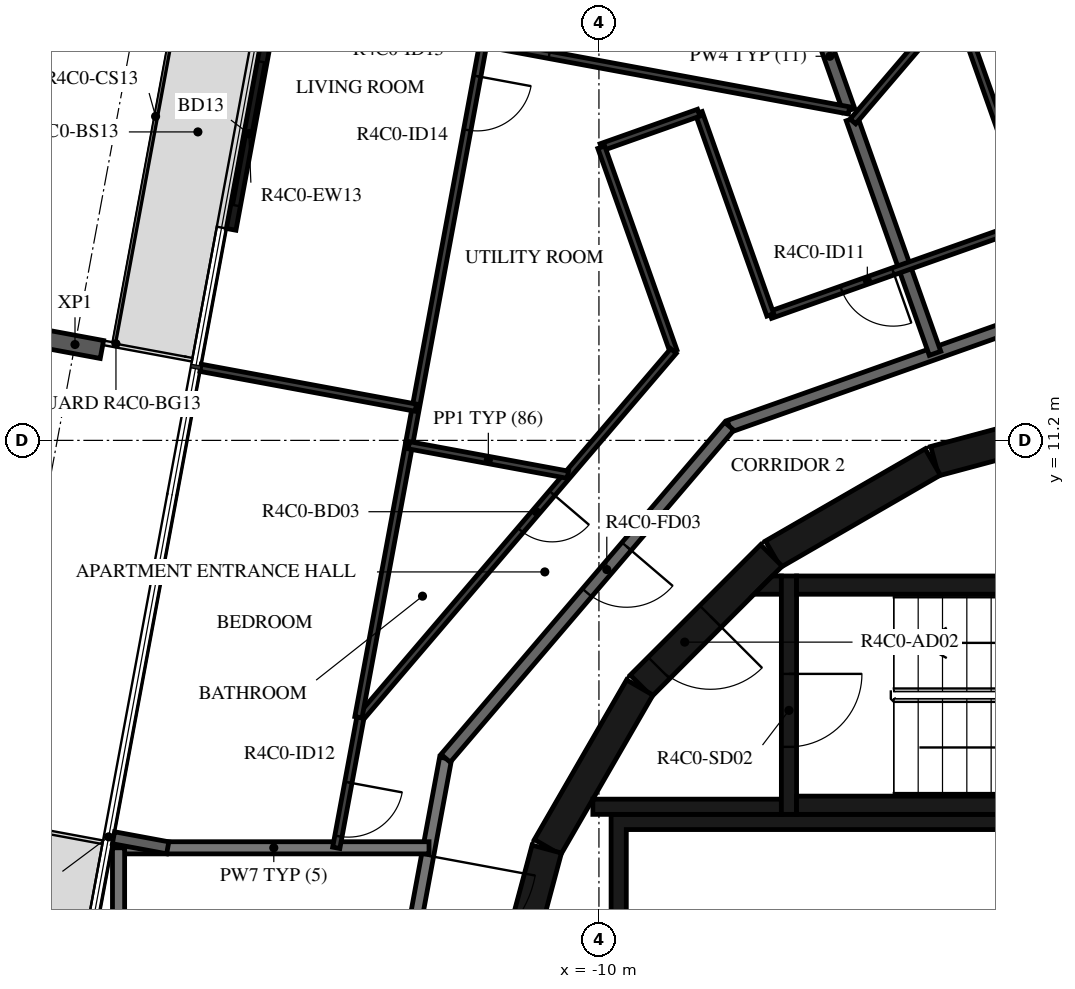
"""IFC4 building model, lengths in metres.
Left out: names, types, materials, properties, quantities, classifications, styles, units other than length and angle.
Written with IfcOpenShell. Run it as: python <this file> out.ifc"""

import sys

from ifc_helpers import new_model, si_unit, direction, frame, frame_2d, origin, origin_2d, place, context, subcontext, project, spatial, polyline, rectangle, i_section, outline, extrude, element, fill, save


model = new_model("IFC4")
c1 = context("Model", 3, precision=1e-05, world=origin(), true_north=direction((0.0, 1.0)))
c2 = subcontext(c1, "Body", "Model", "MODEL_VIEW")
j1 = project(units=[si_unit("LENGTHUNIT", "METRE"), si_unit("PLANEANGLEUNIT", "RADIAN")], contexts=[c1])
p1 = place(None, origin())
s1 = spatial("IfcSite", under=j1, at=p1, CompositionType="ELEMENT")
p2 = place(p1, origin())
s2 = spatial("IfcBuilding", under=s1, at=p2, CompositionType="ELEMENT")
p3 = place(p2, frame((0.0, 0.0, 179.7)))
s3 = spatial("IfcBuildingStorey", under=s2, at=p3, CompositionType="ELEMENT", Elevation=179.7)
p4 = place(p3, frame((-18.616, 12.777, -0.38), z_axis=(0.0, 0.0, 1.0), x_axis=(0.182235967681, 0.983254825609, 0.0)))
e1 = element("IfcColumn", 1, at=p4, inside=s3, PredefinedType="COLUMN", context=c2, shape_type="SweptSolid", body=[
    extrude(i_section(OverallWidth=0.3, OverallDepth=0.9, WebThickness=0.019, FlangeThickness=0.035, FilletRadius=0.03, at=origin_2d()), origin(), (0.0, 0.0, 1.0), 2.616),
])
p5 = place(p3, frame((-15.465, 17.817, 0.0), z_axis=(0.0, 0.0, 1.0), x_axis=(-0.182201278434, -0.983261254264, 0.0)))
e2 = element("IfcWall", 2, at=p5, inside=s3, PredefinedType="STANDARD", context=c2, shape_type="SweptSolid", body=[
    extrude(rectangle(XDim=3.2, YDim=0.16, at=frame_2d((1.6, 0.0))), origin(), (0.0, 0.0, 1.0), 3.05),
])
p6 = place(p5, frame((0.4, 0.0, 0.0)))
e3 = element("IfcOpeningElement", 3, at=p6, cuts=e2, PredefinedType="OPENING", context=c2, shape_type="SweptSolid", body=[
    extrude(rectangle(XDim=2.4, YDim=2.4, at=frame_2d((1.2, 1.2))), frame((0.0, 0.09, 0.0), z_axis=(0.0, -1.0, 0.0), x_axis=(1.0, 0.0, 0.0)), (0.0, 0.0, 1.0), 0.18),
])
for number, where, z_axis, x_axis in (
    (4, (-1.55, 11.643, 0.0), (0.0, 0.0, 1.0), (-0.966, -0.259, 0.0)),
    (5, (-4.51, 10.845, 0.0), (0.0, 0.0, 1.0), (-0.866, -0.5, 0.0)),
):
    element("IfcWall", number, at=place(p3, frame(where, z_axis=z_axis, x_axis=x_axis)), inside=s3, PredefinedType="SHEAR", context=c2, shape_type="SweptSolid", body=[
        extrude(rectangle(XDim=3.033, YDim=0.5, at=frame_2d((1.516, 0.0))), origin(), (0.0, 0.0, 1.0), 3.05),
    ])
p7 = place(p3, frame((-7.164, 9.308, 0.0), z_axis=(0.0, 0.0, 1.0), x_axis=(-0.707106781187, -0.707106781187, 0.0)))
e6 = element("IfcWall", 6, at=p7, inside=s3, PredefinedType="SHEAR", context=c2, shape_type="SweptSolid", body=[
    extrude(rectangle(XDim=3.032, YDim=0.5, at=frame_2d((1.516, 0.0))), origin(), (0.0, 0.0, 1.0), 3.05),
])
p8 = place(p7, frame((1.416, 0.0, 0.0)))
e7 = element("IfcOpeningElement", 7, at=p8, cuts=e6, PredefinedType="OPENING", context=c2, shape_type="SweptSolid", body=[
    extrude(rectangle(XDim=1.2, YDim=2.1, at=frame_2d((0.6, 1.05))), frame((0.0, 0.26, 0.0), z_axis=(0.0, -1.0, 0.0), x_axis=(1.0, 0.0, 0.0)), (0.0, 0.0, 1.0), 0.52),
])
for number, where, z_axis, x_axis in (
    (8, (-9.329, 7.137, 0.0), (0.0, 0.0, 1.0), (-0.5, -0.866, 0.0)),
    (9, (-10.858, 4.479, 0.0), (0.0, 0.0, 1.0), (-0.259, -0.966, 0.0)),
):
    element("IfcWall", number, at=place(p3, frame(where, z_axis=z_axis, x_axis=x_axis)), inside=s3, PredefinedType="SHEAR", context=c2, shape_type="SweptSolid", body=[
        extrude(rectangle(XDim=3.033, YDim=0.5, at=frame_2d((1.516, 0.0))), origin(), (0.0, 0.0, 1.0), 3.05),
    ])
for number, where, z_axis, x_axis in (
    (10, (-6.75, 5.2, 0.0), (0.0, 0.0, 1.0), (1.0, 0.0, 0.0)),
    (11, (-6.75, 8.82, 0.0), (0.0, 0.0, 1.0), (1.0, 0.0, 0.0)),
):
    element("IfcWall", number, at=place(p3, frame(where, z_axis=z_axis, x_axis=x_axis)), inside=s3, PredefinedType="SHEAR", context=c2, shape_type="SweptSolid", body=[
        extrude(rectangle(XDim=6.75, YDim=0.3, at=frame_2d((3.375, 0.0))), origin(), (0.0, 0.0, 1.0), 3.05),
    ])
p9 = place(p3, frame((-6.875, 8.97, 0.0), z_axis=(0.0, 0.0, 1.0), x_axis=(0.0, -1.0, 0.0)))
e12 = element("IfcWall", 12, at=p9, inside=s3, PredefinedType="SHEAR", context=c2, shape_type="SweptSolid", body=[
    extrude(rectangle(XDim=3.92, YDim=0.25, at=frame_2d((1.96, 0.0))), origin(), (0.0, 0.0, 1.0), 3.05),
])
p10 = place(p9, frame((1.61, 0.0, 0.0)))
e13 = element("IfcOpeningElement", 13, at=p10, cuts=e12, PredefinedType="OPENING", context=c2, shape_type="SweptSolid", body=[
    extrude(rectangle(XDim=1.2, YDim=2.1, at=frame_2d((0.6, 1.05))), frame((0.0, 0.135, 0.0), z_axis=(0.0, -1.0, 0.0), x_axis=(1.0, 0.0, 0.0)), (0.0, 0.0, 1.0), 0.27),
])
p11 = place(p3, frame((-7.0, 5.175, 0.0), z_axis=(0.0, 0.0, 1.0), x_axis=(-1.0, 0.0, 0.0)))
e14 = element("IfcWall", 14, at=p11, inside=s3, PredefinedType="SHEAR", context=c2, shape_type="SweptSolid", body=[
    extrude(rectangle(XDim=3.1, YDim=0.25, at=frame_2d((1.55, 0.0))), origin(), (0.0, 0.0, 1.0), 3.05),
])
p12 = place(p3, origin())
e15 = element("IfcWall", 15, at=p12, inside=s3, PredefinedType="SHEAR", context=c2, shape_type="SweptSolid", body=[
    extrude(outline(polyline([(-7.148, 8.97), (-7.0, 8.97), (-7.0, 8.67), (-7.448, 8.67), (-7.148, 8.97)])), origin(), (0.0, 0.0, 1.0), 3.05),
])
p13 = place(p3, origin())
e16 = element("IfcWall", 16, at=p13, inside=s3, PredefinedType="SHEAR", context=c2, shape_type="SweptSolid", body=[
    extrude(outline(polyline([(-9.55, 4.8), (-1.2, 4.8), (-1.2, 1.9), (-0.95, 1.9), (-0.95, 4.8), (0.95, 4.8), (0.95, 1.9), (1.2, 1.9), (1.2, 4.8), (3.1, 4.8), (3.1, 1.9), (3.35, 1.9), (3.35, 4.8), (5.25, 4.8), (5.25, 1.9), (5.5, 1.9), (5.5, 4.8), (7.4, 4.8), (7.4, 1.9), (7.65, 1.9), (7.65, 4.8), (9.55, 4.8), (9.55, 1.9), (9.8, 1.9), (9.8, 4.8), (9.8, 5.05), (-9.8, 5.05), (-9.8, 4.8), (-9.8, 1.9), (-9.55, 1.9), (-9.55, 4.8)])), origin(), (0.0, 0.0, 1.0), 3.05),
])
p14 = place(p3, frame((-12.521, 5.972, 0.0), z_axis=(0.0, 0.0, 1.0), x_axis=(-0.182251559718, -0.983251935661, 0.0)))
e17 = element("IfcWall", 17, at=p14, inside=s3, PredefinedType="STANDARD", context=c2, shape_type="SweptSolid", body=[
    extrude(rectangle(XDim=5.117, YDim=0.2, at=frame_2d((2.559, 0.0))), origin(), (0.0, 0.0, 1.0), 3.05),
])
p15 = place(p14, frame((1.627, 0.0, 0.0)))
e18 = element("IfcOpeningElement", 18, at=p15, cuts=e17, PredefinedType="OPENING", context=c2, shape_type="SweptSolid", body=[
    extrude(rectangle(XDim=1.8, YDim=2.1, at=frame_2d((0.9, 1.05))), frame((0.0, 0.11, 0.0), z_axis=(0.0, -1.0, 0.0), x_axis=(1.0, 0.0, 0.0)), (0.0, 0.0, 1.0), 0.22),
])
p16 = place(p3, frame((-2.359, 13.38, 0.0), z_axis=(0.0, 0.0, 1.0), x_axis=(-0.942647529236, -0.333789807551, 0.0)))
e19 = element("IfcWall", 19, at=p16, inside=s3, PredefinedType="STANDARD", context=c2, shape_type="SweptSolid", body=[
    extrude(rectangle(XDim=5.833, YDim=0.2, at=frame_2d((2.917, 0.0))), origin(), (0.0, 0.0, 1.0), 3.05),
])
p17 = place(p3, frame((-7.858, 11.433, 0.0), z_axis=(0.0, 0.0, 1.0), x_axis=(-0.649440801937, -0.760412154545, 0.0)))
e20 = element("IfcWall", 20, at=p17, inside=s3, PredefinedType="STANDARD", context=c2, shape_type="SweptSolid", body=[
    extrude(rectangle(XDim=7.181, YDim=0.2, at=frame_2d((3.59, 0.0))), origin(), (0.0, 0.0, 1.0), 3.05),
])
p18 = place(p17, frame((2.6, 0.0, 0.0)))
e21 = element("IfcOpeningElement", 21, at=p18, cuts=e20, PredefinedType="OPENING", context=c2, shape_type="SweptSolid", body=[
    extrude(rectangle(XDim=1.0, YDim=2.1, at=frame_2d((0.5, 1.05))), frame((0.0, 0.11, 0.0), z_axis=(0.0, -1.0, 0.0), x_axis=(1.0, 0.0, 0.0)), (0.0, 0.0, 1.0), 0.22),
])
p19 = place(p3, frame((-12.794, 4.5, 0.0), z_axis=(0.0, 0.0, 1.0), x_axis=(-1.0, 0.0, 0.0)))
e22 = element("IfcWall", 22, at=p19, inside=s3, PredefinedType="STANDARD", context=c2, shape_type="SweptSolid", body=[
    extrude(rectangle(XDim=5.106, YDim=0.2, at=frame_2d((2.553, 0.0))), origin(), (0.0, 0.0, 1.0), 3.05),
])
p20 = place(p3, frame((-17.9, 4.5, 0.0), z_axis=(0.0, 0.0, 1.0), x_axis=(0.0, -1.0, 0.0)))
e23 = element("IfcWall", 23, at=p20, inside=s3, PredefinedType="STANDARD", context=c2, shape_type="SweptSolid", body=[
    extrude(rectangle(XDim=9.0, YDim=0.2, at=frame_2d((4.5, 0.0))), origin(), (0.0, 0.0, 1.0), 3.05),
])
p21 = place(p3, frame((-5.839, 16.488, 0.0), z_axis=(0.0, 0.0, 1.0), x_axis=(0.333840515054, -0.942629572265, 0.0)))
e24 = element("IfcWall", 24, at=p21, inside=s3, PredefinedType="STANDARD", context=c2, shape_type="SweptSolid", body=[
    extrude(rectangle(XDim=4.092, YDim=0.2, at=frame_2d((2.046, 0.0))), origin(), (0.0, 0.0, 1.0), 3.05),
])
p22 = place(p3, frame((-6.518, 18.408, 0.0), z_axis=(0.0, 0.0, 1.0), x_axis=(0.333725210903, -0.942670400303, 0.0)))
e25 = element("IfcWall", 25, at=p22, inside=s3, PredefinedType="STANDARD", context=c2, shape_type="SweptSolid", body=[
    extrude(rectangle(XDim=1.89, YDim=0.2, at=frame_2d((0.945, 0.0))), origin(), (0.0, 0.0, 1.0), 3.05),
])
p23 = place(p3, frame((-17.984, 4.665, 0.0), z_axis=(0.0, 0.0, 1.0), x_axis=(0.98328378843, -0.182079629313, 0.0)))
e26 = element("IfcWall", 26, at=p23, inside=s3, PredefinedType="STANDARD", context=c2, shape_type="SweptSolid", body=[
    extrude(rectangle(XDim=0.908, YDim=0.2, at=frame_2d((0.454, 0.0))), origin(), (0.0, 0.0, 1.0), 3.05),
])
p24 = place(p3, frame((8.702, 12.206, 0.0), z_axis=(0.0, 0.0, 1.0), x_axis=(-0.760401313718, 0.649453494945, 0.0)))
e27 = element("IfcWall", 27, at=p24, inside=s3, PredefinedType="PARTITIONING", context=c2, shape_type="SweptSolid", body=[
    extrude(rectangle(XDim=16.724, YDim=0.12, at=frame_2d((8.362, 0.0))), origin(), (0.0, 0.0, 1.0), 3.05),
])
p25 = place(p24, frame((0.2, 0.0, 0.0)))
e28 = element("IfcOpeningElement", 28, at=p25, cuts=e27, PredefinedType="OPENING", context=c2, shape_type="SweptSolid", body=[
    extrude(rectangle(XDim=0.9, YDim=2.1, at=frame_2d((0.45, 1.05))), frame((0.0, 0.07, 0.0), z_axis=(0.0, -1.0, 0.0), x_axis=(1.0, 0.0, 0.0)), (0.0, 0.0, 1.0), 0.14),
])
p26 = place(p24, frame((8.02, 0.0, 0.0)))
e29 = element("IfcOpeningElement", 29, at=p26, cuts=e27, PredefinedType="OPENING", context=c2, shape_type="SweptSolid", body=[
    extrude(rectangle(XDim=0.9, YDim=2.1, at=frame_2d((0.45, 1.05))), frame((0.0, 0.07, 0.0), z_axis=(0.0, -1.0, 0.0), x_axis=(1.0, 0.0, 0.0)), (0.0, 0.0, 1.0), 0.14),
])
p27 = place(p24, frame((14.412, 0.0, 0.0)))
e30 = element("IfcOpeningElement", 30, at=p27, cuts=e27, PredefinedType="OPENING", context=c2, shape_type="SweptSolid", body=[
    extrude(rectangle(XDim=0.9, YDim=2.1, at=frame_2d((0.45, 1.05))), frame((0.0, 0.07, 0.0), z_axis=(0.0, -1.0, 0.0), x_axis=(1.0, 0.0, 0.0)), (0.0, 0.0, 1.0), 0.14),
])
p28 = place(p3, frame((-4.021, 18.101, 0.0), z_axis=(0.0, 0.0, 1.0), x_axis=(0.333811035895, -0.942640012048, 0.0)))
e31 = element("IfcWall", 31, at=p28, inside=s3, PredefinedType="PARTITIONING", context=c2, shape_type="SweptSolid", body=[
    extrude(rectangle(XDim=3.505, YDim=0.12, at=frame_2d((1.752, 0.0))), origin(), (0.0, 0.0, 1.0), 3.05),
])
p29 = place(p3, frame((-2.852, 14.797, 0.0), z_axis=(0.0, 0.0, 1.0), x_axis=(-0.942629664375, -0.333840254973, 0.0)))
e32 = element("IfcWall", 32, at=p29, inside=s3, PredefinedType="PARTITIONING", context=c2, shape_type="SweptSolid", body=[
    extrude(rectangle(XDim=4.593, YDim=0.12, at=frame_2d((2.297, 0.0))), origin(), (0.0, 0.0, 1.0), 3.05),
])
p30 = place(p29, frame((2.451, 0.0, 0.0)))
e33 = element("IfcOpeningElement", 33, at=p30, cuts=e32, PredefinedType="OPENING", context=c2, shape_type="SweptSolid", body=[
    extrude(rectangle(XDim=0.9, YDim=2.1, at=frame_2d((0.45, 1.05))), frame((0.0, 0.07, 0.0), z_axis=(0.0, -1.0, 0.0), x_axis=(1.0, 0.0, 0.0)), (0.0, 0.0, 1.0), 0.14),
])
p31 = place(p3, frame((-1.79, 21.167, 0.0), z_axis=(0.0, 0.0, 1.0), x_axis=(-0.649456490412, -0.7603987553, 0.0)))
e34 = element("IfcWall", 34, at=p31, inside=s3, PredefinedType="PARTITIONING", context=c2, shape_type="SweptSolid", body=[
    extrude(rectangle(XDim=6.21, YDim=0.12, at=frame_2d((3.105, 0.0))), origin(), (0.0, 0.0, 1.0), 3.05),
])
p32 = place(p31, frame((0.2, 0.0, 0.0)))
e35 = element("IfcOpeningElement", 35, at=p32, cuts=e34, PredefinedType="OPENING", context=c2, shape_type="SweptSolid", body=[
    extrude(rectangle(XDim=0.9, YDim=2.1, at=frame_2d((0.45, 1.05))), frame((0.0, 0.07, 0.0), z_axis=(0.0, -1.0, 0.0), x_axis=(1.0, 0.0, 0.0)), (0.0, 0.0, 1.0), 0.14),
])
p33 = place(p3, frame((-7.181, 13.263, 0.0), z_axis=(0.0, 0.0, 1.0), x_axis=(-0.333822798183, 0.942635846663, 0.0)))
e36 = element("IfcWall", 36, at=p33, inside=s3, PredefinedType="PARTITIONING", context=c2, shape_type="SweptSolid", body=[
    extrude(rectangle(XDim=3.527, YDim=0.12, at=frame_2d((1.764, 0.0))), origin(), (0.0, 0.0, 1.0), 3.05),
])
p34 = place(p3, frame((-8.359, 16.588, 0.0), z_axis=(0.0, 0.0, 1.0), x_axis=(-0.942661115325, -0.333751436931, 0.0)))
e37 = element("IfcWall", 37, at=p34, inside=s3, PredefinedType="PARTITIONING", context=c2, shape_type="SweptSolid", body=[
    extrude(rectangle(XDim=1.7, YDim=0.12, at=frame_2d((0.85, 0.0))), origin(), (0.0, 0.0, 1.0), 3.05),
])
p35 = place(p3, frame((-9.961, 16.021, 0.0), z_axis=(0.0, 0.0, 1.0), x_axis=(0.333803930912, -0.94264252806, 0.0)))
e38 = element("IfcWall", 38, at=p35, inside=s3, PredefinedType="PARTITIONING", context=c2, shape_type="SweptSolid", body=[
    extrude(rectangle(XDim=3.556, YDim=0.12, at=frame_2d((1.778, 0.0))), origin(), (0.0, 0.0, 1.0), 3.05),
])
p36 = place(p3, frame((-8.774, 12.669, 0.0), z_axis=(0.0, 0.0, 1.0), x_axis=(-0.649446157105, -0.760407580855, 0.0)))
e39 = element("IfcWall", 39, at=p36, inside=s3, PredefinedType="PARTITIONING", context=c2, shape_type="SweptSolid", body=[
    extrude(rectangle(XDim=7.927, YDim=0.12, at=frame_2d((3.964, 0.0))), origin(), (0.0, 0.0, 1.0), 3.05),
])
p37 = place(p36, frame((3.074, 0.0, 0.0)))
e40 = element("IfcOpeningElement", 40, at=p37, cuts=e39, PredefinedType="OPENING", context=c2, shape_type="SweptSolid", body=[
    extrude(rectangle(XDim=0.8, YDim=2.1, at=frame_2d((0.4, 1.05))), frame((0.0, 0.07, 0.0), z_axis=(0.0, -1.0, 0.0), x_axis=(1.0, 0.0, 0.0)), (0.0, 0.0, 1.0), 0.14),
])
p38 = place(p3, frame((-13.923, 6.641, 0.0), z_axis=(0.0, 0.0, 1.0), x_axis=(-0.182209715759, -0.983259690765, 0.0)))
e41 = element("IfcWall", 41, at=p38, inside=s3, PredefinedType="PARTITIONING", context=c2, shape_type="SweptSolid", body=[
    extrude(rectangle(XDim=2.177, YDim=0.12, at=frame_2d((1.089, 0.0))), origin(), (0.0, 0.0, 1.0), 3.05),
])
p39 = place(p38, frame((1.083, 0.0, 0.0)))
e42 = element("IfcOpeningElement", 42, at=p39, cuts=e41, PredefinedType="OPENING", context=c2, shape_type="SweptSolid", body=[
    extrude(rectangle(XDim=0.9, YDim=2.1, at=frame_2d((0.45, 1.05))), frame((0.0, 0.07, 0.0), z_axis=(0.0, -1.0, 0.0), x_axis=(1.0, 0.0, 0.0)), (0.0, 0.0, 1.0), 0.14),
])
p40 = place(p3, frame((-13.955, 6.647, 0.0), z_axis=(0.0, 0.0, 1.0), x_axis=(0.182264522222, 0.983249532896, 0.0)))
e43 = element("IfcWall", 43, at=p40, inside=s3, PredefinedType="PARTITIONING", context=c2, shape_type="SweptSolid", body=[
    extrude(rectangle(XDim=4.589, YDim=0.12, at=frame_2d((2.294, 0.0))), origin(), (0.0, 0.0, 1.0), 3.05),
])
p41 = place(p3, frame((-11.899, 17.74, 0.0), z_axis=(0.0, 0.0, 1.0), x_axis=(0.983254721409, -0.182236529889, 0.0)))
e44 = element("IfcWall", 44, at=p41, inside=s3, PredefinedType="PARTITIONING", context=c2, shape_type="SweptSolid", body=[
    extrude(rectangle(XDim=6.114, YDim=0.12, at=frame_2d((3.057, 0.0))), origin(), (0.0, 0.0, 1.0), 3.05),
])
p42 = place(p41, frame((0.2, 0.0, 0.0)))
e45 = element("IfcOpeningElement", 45, at=p42, cuts=e44, PredefinedType="OPENING", context=c2, shape_type="SweptSolid", body=[
    extrude(rectangle(XDim=0.9, YDim=2.1, at=frame_2d((0.45, 1.05))), frame((0.0, 0.07, 0.0), z_axis=(0.0, -1.0, 0.0), x_axis=(1.0, 0.0, 0.0)), (0.0, 0.0, 1.0), 0.14),
])
p43 = place(p3, frame((-11.396, 20.453, 0.0), z_axis=(0.0, 0.0, 1.0), x_axis=(-0.182223370439, -0.983257160292, 0.0)))
e46 = element("IfcWall", 46, at=p43, inside=s3, PredefinedType="PARTITIONING", context=c2, shape_type="SweptSolid", body=[
    extrude(rectangle(XDim=9.452, YDim=0.12, at=frame_2d((4.726, 0.0))), origin(), (0.0, 0.0, 1.0), 3.05),
])
p44 = place(p43, frame((3.319, 0.0, 0.0)))
e47 = element("IfcOpeningElement", 47, at=p44, cuts=e46, PredefinedType="OPENING", context=c2, shape_type="SweptSolid", body=[
    extrude(rectangle(XDim=0.9, YDim=2.1, at=frame_2d((0.45, 1.05))), frame((0.0, 0.07, 0.0), z_axis=(0.0, -1.0, 0.0), x_axis=(1.0, 0.0, 0.0)), (0.0, 0.0, 1.0), 0.14),
])
p45 = place(p43, frame((0.2, 0.0, 0.0)))
e48 = element("IfcOpeningElement", 48, at=p45, cuts=e46, PredefinedType="OPENING", context=c2, shape_type="SweptSolid", body=[
    extrude(rectangle(XDim=0.9, YDim=2.1, at=frame_2d((0.45, 1.05))), frame((0.0, 0.07, 0.0), z_axis=(0.0, -1.0, 0.0), x_axis=(1.0, 0.0, 0.0)), (0.0, 0.0, 1.0), 0.14),
])
p46 = place(p3, frame((-13.126, 11.12, 0.0), z_axis=(0.0, 0.0, 1.0), x_axis=(0.983257646361, -0.182220747645, 0.0)))
e49 = element("IfcWall", 49, at=p46, inside=s3, PredefinedType="PARTITIONING", context=c2, shape_type="SweptSolid", body=[
    extrude(rectangle(XDim=2.659, YDim=0.12, at=frame_2d((1.33, 0.0))), origin(), (0.0, 0.0, 1.0), 3.05),
])
p47 = place(p3, frame((-16.552, 12.394, 0.0), z_axis=(0.0, 0.0, 1.0), x_axis=(0.983257712156, -0.182220392618, 0.0)))
e50 = element("IfcWall", 50, at=p47, inside=s3, PredefinedType="PARTITIONING", context=c2, shape_type="SweptSolid", body=[
    extrude(rectangle(XDim=3.6, YDim=0.12, at=frame_2d((1.8, 0.0))), origin(), (0.0, 0.0, 1.0), 3.05),
])
p48 = place(p6, origin())
e51 = element("IfcDoor", 51, at=p48, inside=s3, OperationType="DOUBLE_DOOR_SLIDING", PredefinedType="DOOR", context=c2, shape_type="SweptSolid", body=[
    extrude(rectangle(XDim=2.4, YDim=2.4, at=frame_2d((1.2, 1.2))), frame((0.0, 0.025, 0.0), z_axis=(0.0, -1.0, 0.0), x_axis=(1.0, 0.0, 0.0)), (0.0, 0.0, 1.0), 0.05),
])
fill(e3, e51)
p49 = place(p10, origin())
e52 = element("IfcDoor", 52, at=p49, inside=s3, OperationType="SINGLE_SWING_LEFT", PredefinedType="DOOR", context=c2, shape_type="SweptSolid", body=[
    extrude(rectangle(XDim=1.2, YDim=2.1, at=frame_2d((0.6, 1.05))), frame((0.0, 0.025, 0.0), z_axis=(0.0, -1.0, 0.0), x_axis=(1.0, 0.0, 0.0)), (0.0, 0.0, 1.0), 0.05),
])
fill(e13, e52)
p50 = place(p8, origin())
e53 = element("IfcDoor", 53, at=p50, inside=s3, OperationType="SINGLE_SWING_RIGHT", PredefinedType="DOOR", context=c2, shape_type="SweptSolid", body=[
    extrude(rectangle(XDim=1.2, YDim=2.1, at=frame_2d((0.6, 1.05))), frame((0.0, 0.025, 0.0), z_axis=(0.0, -1.0, 0.0), x_axis=(1.0, 0.0, 0.0)), (0.0, 0.0, 1.0), 0.05),
])
fill(e7, e53)
p51 = place(p18, origin())
e54 = element("IfcDoor", 54, at=p51, inside=s3, OperationType="SINGLE_SWING_LEFT", PredefinedType="DOOR", context=c2, shape_type="SweptSolid", body=[
    extrude(rectangle(XDim=1.0, YDim=2.1, at=frame_2d((0.5, 1.05))), frame((0.0, 0.025, 0.0), z_axis=(0.0, -1.0, 0.0), x_axis=(1.0, 0.0, 0.0)), (0.0, 0.0, 1.0), 0.05),
])
fill(e21, e54)
p52 = place(p30, origin())
e55 = element("IfcDoor", 55, at=p52, inside=s3, OperationType="SINGLE_SWING_LEFT", PredefinedType="DOOR", context=c2, shape_type="SweptSolid", body=[
    extrude(rectangle(XDim=0.9, YDim=2.1, at=frame_2d((0.45, 1.05))), frame((0.0, 0.025, 0.0), z_axis=(0.0, -1.0, 0.0), x_axis=(1.0, 0.0, 0.0)), (0.0, 0.0, 1.0), 0.05),
])
fill(e33, e55)
p53 = place(p37, origin())
e56 = element("IfcDoor", 56, at=p53, inside=s3, OperationType="SINGLE_SWING_LEFT", PredefinedType="DOOR", context=c2, shape_type="SweptSolid", body=[
    extrude(rectangle(XDim=0.8, YDim=2.1, at=frame_2d((0.4, 1.05))), frame((0.0, 0.025, 0.0), z_axis=(0.0, -1.0, 0.0), x_axis=(1.0, 0.0, 0.0)), (0.0, 0.0, 1.0), 0.05),
])
fill(e40, e56)
p54 = place(p39, origin())
e57 = element("IfcDoor", 57, at=p54, inside=s3, OperationType="SINGLE_SWING_LEFT", PredefinedType="DOOR", context=c2, shape_type="SweptSolid", body=[
    extrude(rectangle(XDim=0.9, YDim=2.1, at=frame_2d((0.45, 1.05))), frame((0.0, 0.025, 0.0), z_axis=(0.0, -1.0, 0.0), x_axis=(1.0, 0.0, 0.0)), (0.0, 0.0, 1.0), 0.05),
])
fill(e42, e57)
p55 = place(p42, origin())
e58 = element("IfcDoor", 58, at=p55, inside=s3, OperationType="SINGLE_SWING_LEFT", PredefinedType="DOOR", context=c2, shape_type="SweptSolid", body=[
    extrude(rectangle(XDim=0.9, YDim=2.1, at=frame_2d((0.45, 1.05))), frame((0.0, 0.025, 0.0), z_axis=(0.0, -1.0, 0.0), x_axis=(1.0, 0.0, 0.0)), (0.0, 0.0, 1.0), 0.05),
])
fill(e45, e58)
p56 = place(p44, origin())
e59 = element("IfcDoor", 59, at=p56, inside=s3, OperationType="SINGLE_SWING_LEFT", PredefinedType="DOOR", context=c2, shape_type="SweptSolid", body=[
    extrude(rectangle(XDim=0.9, YDim=2.1, at=frame_2d((0.45, 1.05))), frame((0.0, 0.025, 0.0), z_axis=(0.0, -1.0, 0.0), x_axis=(1.0, 0.0, 0.0)), (0.0, 0.0, 1.0), 0.05),
])
fill(e47, e59)
p57 = place(p15, origin())
e60 = element("IfcDoor", 60, at=p57, inside=s3, OperationType="DOUBLE_DOOR_SINGLE_SWING", PredefinedType="DOOR", context=c2, shape_type="SweptSolid", body=[
    extrude(rectangle(XDim=1.8, YDim=2.1, at=frame_2d((0.9, 1.05))), frame((0.0, 0.025, 0.0), z_axis=(0.0, -1.0, 0.0), x_axis=(1.0, 0.0, 0.0)), (0.0, 0.0, 1.0), 0.05),
])
fill(e18, e60)
save(model, sys.argv[1])
